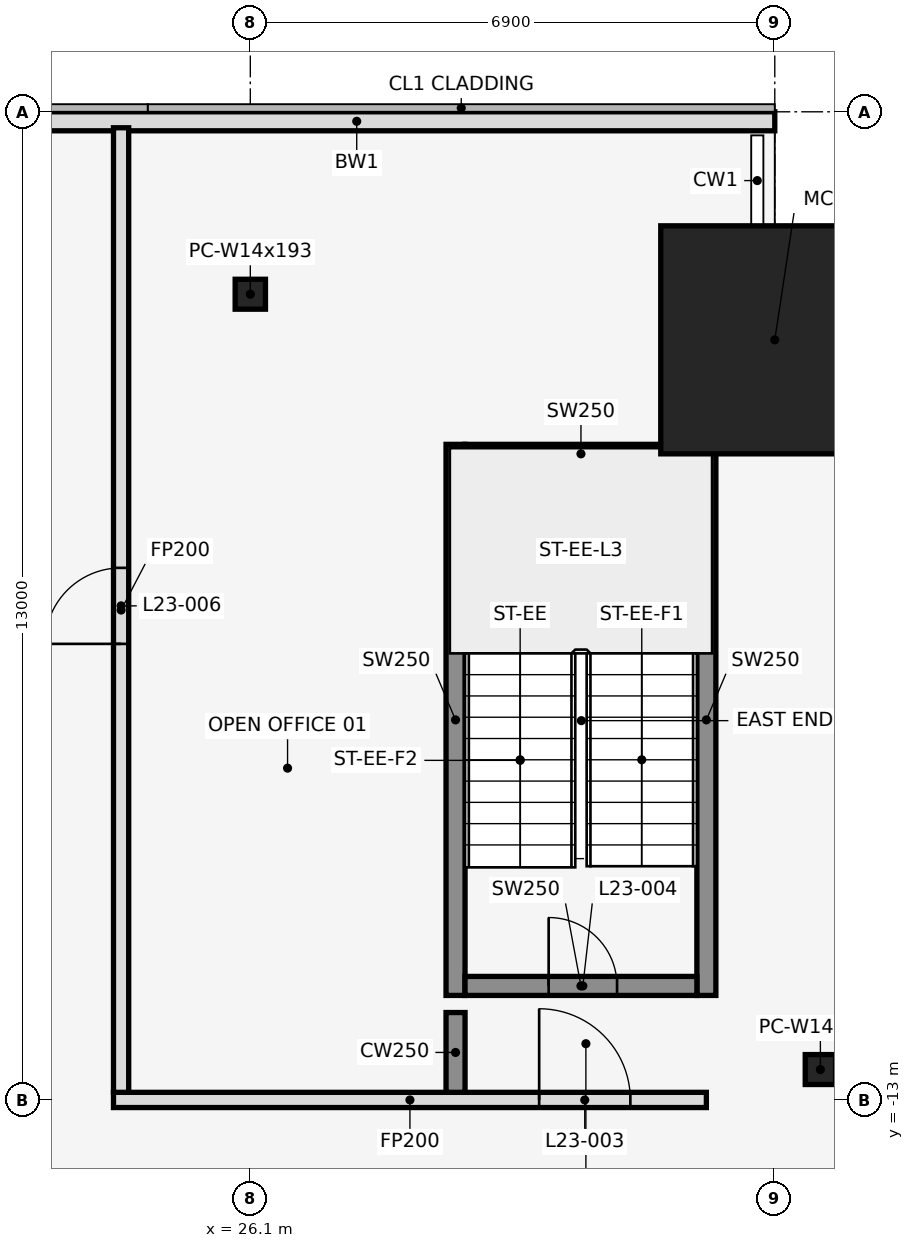
"""IFC4 building model, lengths in metres.
Left out: names, types, materials, properties, quantities, classifications, styles, units other than length and angle.
Written with IfcOpenShell. Run it as: python <this file> out.ifc"""

import sys

from ifc_helpers import new_model, si_unit, direction, frame, frame_2d, origin, origin_2d, place, context, subcontext, project, spatial, rectangle, hollow_rectangle, i_section, extrude, element, fill, save


model = new_model("IFC4")
c1 = context("Model", 3, precision=1e-05, world=origin(), true_north=direction((0.0, 1.0)))
c2 = subcontext(c1, "Body", "Model", "MODEL_VIEW")
j1 = project(units=[si_unit("LENGTHUNIT", "METRE"), si_unit("PLANEANGLEUNIT", "RADIAN")], contexts=[c1])
p1 = place(None, origin())
s1 = spatial("IfcSite", under=j1, at=p1, CompositionType="ELEMENT")
p2 = place(p1, origin())
s2 = spatial("IfcBuilding", under=s1, at=p2, CompositionType="ELEMENT")
p3 = place(p2, frame((0.0, 0.0, 110.4)))
s3 = spatial("IfcBuildingStorey", under=s2, at=p3, CompositionType="ELEMENT", Elevation=110.4)
p4 = place(p3, frame((26.1, -2.4, 0.0), z_axis=(0.0, 0.0, 1.0), x_axis=(1.0, 0.0, 0.0)))
e1 = element("IfcColumn", 1, at=p4, inside=s3, PredefinedType="COLUMN", context=c2, shape_type="SweptSolid", body=[
    extrude(i_section(OverallWidth=0.399, OverallDepth=0.394, WebThickness=0.023, FlangeThickness=0.037, at=origin_2d()), origin(), (0.0, 0.0, 1.0), 4.1),
])
p5 = place(p3, frame((33.0, -3.0, 0.0), z_axis=(0.0, 0.0, 1.0), x_axis=(1.0, 0.0, 0.0)))
e2 = element("IfcColumn", 2, at=p5, inside=s3, PredefinedType="COLUMN", context=c2, shape_type="SweptSolid", body=[
    extrude(hollow_rectangle(XDim=3.0, YDim=3.0, WallThickness=0.09, at=origin_2d()), origin(), (0.0, 0.0, 1.0), 4.1),
])
p6 = place(p3, frame((33.6, -12.6, 0.0), z_axis=(0.0, 0.0, 1.0), x_axis=(1.0, 0.0, 0.0)))
e3 = element("IfcColumn", 3, at=p6, inside=s3, PredefinedType="COLUMN", context=c2, shape_type="SweptSolid", body=[
    extrude(i_section(OverallWidth=0.399, OverallDepth=0.394, WebThickness=0.023, FlangeThickness=0.037, at=origin_2d()), origin(), (0.0, 0.0, 1.0), 4.1),
])
p7 = place(p3, frame((33.0, -0.125, 0.0), z_axis=(0.0, 0.0, 1.0), x_axis=(-1.0, 0.0, 0.0)))
e4 = element("IfcWall", 4, at=p7, inside=s3, PredefinedType="STANDARD", context=c2, shape_type="SweptSolid", body=[
    extrude(rectangle(XDim=11.0, YDim=0.25, at=frame_2d((5.5, 0.0))), origin(), (0.0, 0.0, 1.0), 3.95),
])
for number, where, z_axis, x_axis in (
    (5, (28.8, -11.625, 0.0), (0.0, 0.0, 1.0), (0.0, 1.0, 0.0)),
    (6, (32.1, -11.625, 0.0), (0.0, 0.0, 1.0), (0.0, 1.0, 0.0)),
):
    element("IfcWall", number, at=place(p3, frame(where, z_axis=z_axis, x_axis=x_axis)), inside=s3, PredefinedType="SHEAR", context=c2, shape_type="SweptSolid", body=[
        extrude(rectangle(XDim=7.25, YDim=0.25, at=frame_2d((3.625, 0.0))), origin(), (0.0, 0.0, 1.0), 4.1),
    ])
p8 = place(p3, frame((28.925, -11.5, 0.0), z_axis=(0.0, 0.0, 1.0), x_axis=(1.0, 0.0, 0.0)))
e7 = element("IfcWall", 7, at=p8, inside=s3, PredefinedType="SHEAR", context=c2, shape_type="SweptSolid", body=[
    extrude(rectangle(XDim=3.05, YDim=0.25, at=frame_2d((1.525, 0.0))), origin(), (0.0, 0.0, 1.0), 4.1),
])
p9 = place(p8, frame((1.1, 0.0, 0.0)))
e8 = element("IfcOpeningElement", 8, at=p9, cuts=e7, PredefinedType="OPENING", context=c2, shape_type="SweptSolid", body=[
    extrude(rectangle(XDim=0.9, YDim=2.1, at=frame_2d((0.45, 1.05))), frame((0.0, 0.137, 0.0), z_axis=(0.0, -1.0, 0.0), x_axis=(1.0, 0.0, 0.0)), (0.0, 0.0, 1.0), 0.274),
])
p10 = place(p3, frame((28.925, -4.5, 0.0), z_axis=(0.0, 0.0, 1.0), x_axis=(1.0, 0.0, 0.0)))
e9 = element("IfcWall", 9, at=p10, inside=s3, PredefinedType="SHEAR", context=c2, shape_type="SweptSolid", body=[
    extrude(rectangle(XDim=3.05, YDim=0.25, at=frame_2d((1.525, 0.0))), origin(), (0.0, 0.0, 1.0), 4.1),
])
p11 = place(p3, frame((24.3, -13.0, 0.0), z_axis=(0.0, 0.0, 1.0), x_axis=(1.0, 0.0, 0.0)))
e10 = element("IfcWall", 10, at=p11, inside=s3, PredefinedType="PARTITIONING", context=c2, shape_type="SweptSolid", body=[
    extrude(rectangle(XDim=7.8, YDim=0.2, at=frame_2d((3.9, 0.0))), origin(), (0.0, 0.0, 1.0), 3.018),
])
p12 = place(p11, frame((5.6, 0.0, 0.0)))
e11 = element("IfcOpeningElement", 11, at=p12, cuts=e10, PredefinedType="OPENING", context=c2, shape_type="SweptSolid", body=[
    extrude(rectangle(XDim=1.2, YDim=2.1, at=frame_2d((0.6, 1.05))), frame((0.0, 0.112, 0.0), z_axis=(0.0, -1.0, 0.0), x_axis=(1.0, 0.0, 0.0)), (0.0, 0.0, 1.0), 0.224),
])
p13 = place(p3, frame((24.4, -12.9, 0.0), z_axis=(0.0, 0.0, 1.0), x_axis=(0.0, 1.0, 0.0)))
e12 = element("IfcWall", 12, at=p13, inside=s3, PredefinedType="PARTITIONING", context=c2, shape_type="SweptSolid", body=[
    extrude(rectangle(XDim=12.69, YDim=0.2, at=frame_2d((6.345, 0.0))), origin(), (0.0, 0.0, 1.0), 3.018),
])
p14 = place(p13, frame((5.9, 0.0, 0.0)))
e13 = element("IfcOpeningElement", 13, at=p14, cuts=e12, PredefinedType="OPENING", context=c2, shape_type="SweptSolid", body=[
    extrude(rectangle(XDim=1.0, YDim=2.1, at=frame_2d((0.5, 1.05))), frame((0.0, 0.112, 0.0), z_axis=(0.0, -1.0, 0.0), x_axis=(1.0, 0.0, 0.0)), (0.0, 0.0, 1.0), 0.224),
])
p15 = place(p3, frame((28.8, -12.9, 0.0), z_axis=(0.0, 0.0, 1.0), x_axis=(0.0, 1.0, 0.0)))
e14 = element("IfcWall", 14, at=p15, inside=s3, PredefinedType="SHEAR", context=c2, shape_type="SweptSolid", body=[
    extrude(rectangle(XDim=1.05, YDim=0.25, at=frame_2d((0.525, 0.0))), origin(), (0.0, 0.0, 1.0), 4.1),
])
p16 = place(p12, origin())
e15 = element("IfcDoor", 15, at=p16, inside=s3, OperationType="SINGLE_SWING_RIGHT", PredefinedType="DOOR", context=c2, shape_type="SweptSolid", body=[
    extrude(rectangle(XDim=1.2, YDim=2.1, at=frame_2d((0.6, 1.05))), frame((0.0, 0.025, 0.0), z_axis=(0.0, -1.0, 0.0), x_axis=(1.0, 0.0, 0.0)), (0.0, 0.0, 1.0), 0.05),
])
fill(e11, e15)
p17 = place(p9, origin())
e16 = element("IfcDoor", 16, at=p17, inside=s3, OperationType="SINGLE_SWING_LEFT", PredefinedType="DOOR", context=c2, shape_type="SweptSolid", body=[
    extrude(rectangle(XDim=0.9, YDim=2.1, at=frame_2d((0.45, 1.05))), frame((0.0, 0.025, 0.0), z_axis=(0.0, -1.0, 0.0), x_axis=(1.0, 0.0, 0.0)), (0.0, 0.0, 1.0), 0.05),
])
fill(e8, e16)
p18 = place(p14, frame((1.0, 0.0, 0.0), z_axis=(0.0, 0.0, 1.0), x_axis=(-1.0, 0.0, 0.0)))
e17 = element("IfcDoor", 17, at=p18, inside=s3, OperationType="SINGLE_SWING_RIGHT", PredefinedType="DOOR", context=c2, shape_type="SweptSolid", body=[
    extrude(rectangle(XDim=1.0, YDim=2.1, at=frame_2d((0.5, 1.05))), frame((0.0, 0.025, 0.0), z_axis=(0.0, -1.0, 0.0), x_axis=(1.0, 0.0, 0.0)), (0.0, 0.0, 1.0), 0.05),
])
fill(e13, e17)
save(model, sys.argv[1])
